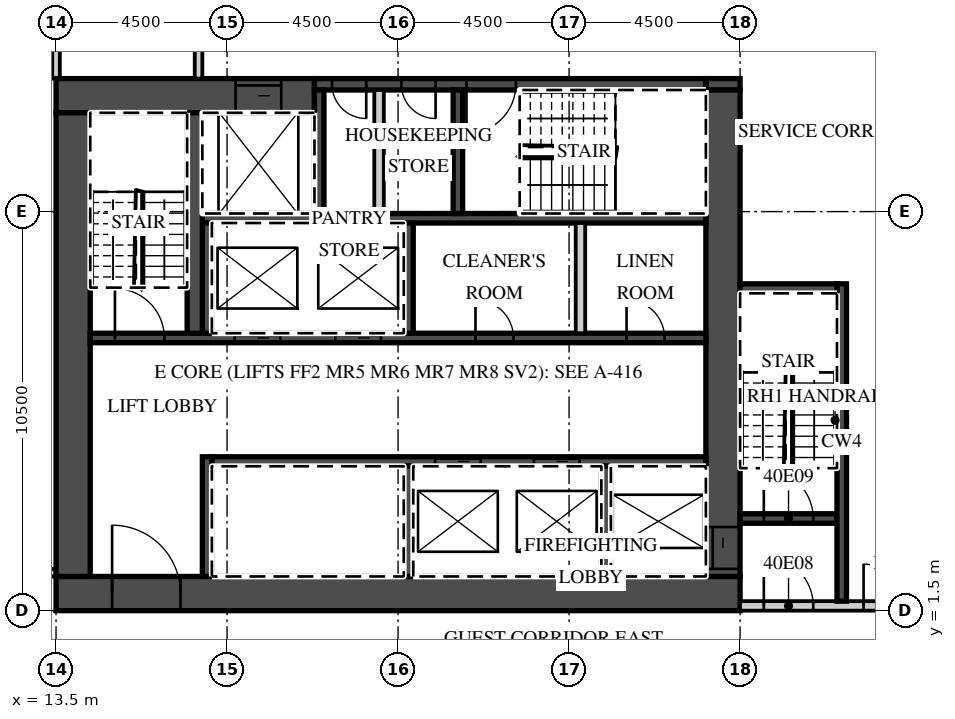
"""IFC4 building model, lengths in metres.
Left out: names, types, materials, properties, quantities, classifications, styles, units other than length and angle.
Written with IfcOpenShell. Run it as: python <this file> out.ifc"""

import sys

from ifc_helpers import new_model, si_unit, direction, frame, frame_2d, origin, place, context, subcontext, project, spatial, rectangle, extrude, element, fill, save


model = new_model("IFC4")
c1 = context("Model", 3, precision=1e-05, world=origin(), true_north=direction((0.0, 1.0)))
c2 = subcontext(c1, "Body", "Model", "MODEL_VIEW")
j1 = project(units=[si_unit("LENGTHUNIT", "METRE"), si_unit("PLANEANGLEUNIT", "RADIAN")], contexts=[c1])
p1 = place(None, origin())
s1 = spatial("IfcSite", under=j1, at=p1, CompositionType="ELEMENT")
p2 = place(p1, origin())
s2 = spatial("IfcBuilding", under=s1, at=p2, CompositionType="ELEMENT")
p3 = place(p2, frame((0.0, 0.0, 173.5)))
s3 = spatial("IfcBuildingStorey", under=s2, at=p3, CompositionType="ELEMENT", Elevation=173.5)
p4 = place(p3, frame((13.5, 15.5, 0.0), z_axis=(0.0, 0.0, 1.0), x_axis=(0.0, 1.0, 0.0)))
e1 = element("IfcWall", 1, at=p4, inside=s3, PredefinedType="PARTITIONING", context=c2, shape_type="SweptSolid", body=[
    extrude(rectangle(XDim=6.089, YDim=0.2, at=frame_2d((3.044, 0.0))), origin(), (0.0, 0.0, 1.0), 3.02),
])
p5 = place(p3, frame((-13.5, 2.5, 0.0), z_axis=(0.0, 0.0, 1.0), x_axis=(1.0, 0.0, 0.0)))
e2 = element("IfcWall", 2, at=p5, inside=s3, PredefinedType="PARTITIONING", context=c2, shape_type="SweptSolid", body=[
    extrude(rectangle(XDim=27.0, YDim=0.2, at=frame_2d((13.5, 0.0))), origin(), (0.0, 0.0, 1.0), 3.02),
])
p6 = place(p5, frame((0.575, 0.0, 0.0)))
e3 = element("IfcOpeningElement", 3, at=p6, cuts=e2, PredefinedType="OPENING", context=c2, shape_type="SweptSolid", body=[
    extrude(rectangle(XDim=1.0, YDim=2.1, at=frame_2d((0.5, 1.05))), frame((0.0, 0.11, 0.0), z_axis=(0.0, -1.0, 0.0), x_axis=(1.0, 0.0, 0.0)), (0.0, 0.0, 1.0), 0.22),
])
p7 = place(p5, frame((7.45, 0.0, 0.0)))
e4 = element("IfcOpeningElement", 4, at=p7, cuts=e2, PredefinedType="OPENING", context=c2, shape_type="SweptSolid", body=[
    extrude(rectangle(XDim=1.0, YDim=2.1, at=frame_2d((0.5, 1.05))), frame((0.0, 0.11, 0.0), z_axis=(0.0, -1.0, 0.0), x_axis=(1.0, 0.0, 0.0)), (0.0, 0.0, 1.0), 0.22),
])
p8 = place(p5, frame((11.925, 0.0, 0.0)))
e5 = element("IfcOpeningElement", 5, at=p8, cuts=e2, PredefinedType="OPENING", context=c2, shape_type="SweptSolid", body=[
    extrude(rectangle(XDim=1.0, YDim=2.1, at=frame_2d((0.5, 1.05))), frame((0.0, 0.11, 0.0), z_axis=(0.0, -1.0, 0.0), x_axis=(1.0, 0.0, 0.0)), (0.0, 0.0, 1.0), 0.22),
])
p9 = place(p5, frame((15.938, 0.0, 0.0)))
e6 = element("IfcOpeningElement", 6, at=p9, cuts=e2, PredefinedType="OPENING", context=c2, shape_type="SweptSolid", body=[
    extrude(rectangle(XDim=1.2, YDim=2.1, at=frame_2d((0.6, 1.05))), frame((0.0, 0.11, 0.0), z_axis=(0.0, -1.0, 0.0), x_axis=(1.0, 0.0, 0.0)), (0.0, 0.0, 1.0), 0.22),
])
p10 = place(p5, frame((25.425, 0.0, 0.0)))
e7 = element("IfcOpeningElement", 7, at=p10, cuts=e2, PredefinedType="OPENING", context=c2, shape_type="SweptSolid", body=[
    extrude(rectangle(XDim=1.0, YDim=2.1, at=frame_2d((0.5, 1.05))), frame((0.0, 0.11, 0.0), z_axis=(0.0, -1.0, 0.0), x_axis=(1.0, 0.0, 0.0)), (0.0, 0.0, 1.0), 0.22),
])
p11 = place(p3, frame((13.5, 1.95, 0.0), z_axis=(0.0, 0.0, 1.0), x_axis=(1.0, 0.0, 0.0)))
e8 = element("IfcWall", 8, at=p11, inside=s3, PredefinedType="SHEAR", context=c2, shape_type="SweptSolid", body=[
    extrude(rectangle(XDim=18.0, YDim=0.9, at=frame_2d((9.0, 0.0))), origin(), (0.0, 0.0, 1.0), 3.02),
])
p12 = place(p11, frame((1.475, 0.0, 0.0)))
e9 = element("IfcOpeningElement", 9, at=p12, cuts=e8, PredefinedType="OPENING", context=c2, shape_type="SweptSolid", body=[
    extrude(rectangle(XDim=1.8, YDim=2.1, at=frame_2d((0.9, 1.05))), frame((0.0, 0.46, 0.0), z_axis=(0.0, -1.0, 0.0), x_axis=(1.0, 0.0, 0.0)), (0.0, 0.0, 1.0), 0.92),
])
p13 = place(p3, frame((13.5, 15.05, 0.0), z_axis=(0.0, 0.0, 1.0), x_axis=(1.0, 0.0, 0.0)))
e10 = element("IfcWall", 10, at=p13, inside=s3, PredefinedType="SHEAR", context=c2, shape_type="SweptSolid", body=[
    extrude(rectangle(XDim=6.8, YDim=0.9, at=frame_2d((3.4, 0.0))), origin(), (0.0, 0.0, 1.0), 3.02),
])
p14 = place(p13, frame((4.725, 0.0, 0.0)))
e11 = element("IfcOpeningElement", 11, at=p14, cuts=e10, PredefinedType="OPENING", context=c2, shape_type="SweptSolid", body=[
    extrude(rectangle(XDim=1.2, YDim=2.1, at=frame_2d((0.6, 1.05))), frame((0.0, 0.46, 0.0), z_axis=(0.0, -1.0, 0.0), x_axis=(1.0, 0.0, 0.0)), (0.0, 0.0, 1.0), 0.92),
])
p15 = place(p3, frame((30.6, 15.35, 0.0), z_axis=(0.0, 0.0, 1.0), x_axis=(1.0, 0.0, 0.0)))
e12 = element("IfcWall", 12, at=p15, inside=s3, PredefinedType="SHEAR", context=c2, shape_type="SweptSolid", body=[
    extrude(rectangle(XDim=0.9, YDim=0.3, at=frame_2d((0.45, 0.0))), origin(), (0.0, 0.0, 1.0), 3.02),
])
p16 = place(p3, frame((20.3, 15.35, 0.0), z_axis=(0.0, 0.0, 1.0), x_axis=(1.0, 0.0, 0.0)))
e13 = element("IfcWall", 13, at=p16, inside=s3, PredefinedType="SHEAR", context=c2, shape_type="SweptSolid", body=[
    extrude(rectangle(XDim=10.3, YDim=0.3, at=frame_2d((5.15, 0.0))), origin(), (0.0, 0.0, 1.0), 3.02),
])
p17 = place(p16, frame((4.0, 0.0, 0.0)))
e14 = element("IfcOpeningElement", 14, at=p17, cuts=e13, PredefinedType="OPENING", context=c2, shape_type="SweptSolid", body=[
    extrude(rectangle(XDim=1.3, YDim=2.1, at=frame_2d((0.65, 1.05))), frame((0.0, 0.16, 0.0), z_axis=(0.0, -1.0, 0.0), x_axis=(1.0, 0.0, 0.0)), (0.0, 0.0, 1.0), 0.32),
])
p18 = place(p16, frame((2.288, 0.0, 0.0)))
e15 = element("IfcOpeningElement", 15, at=p18, cuts=e13, PredefinedType="OPENING", context=c2, shape_type="SweptSolid", body=[
    extrude(rectangle(XDim=0.9, YDim=2.1, at=frame_2d((0.45, 1.05))), frame((0.0, 0.16, 0.0), z_axis=(0.0, -1.0, 0.0), x_axis=(1.0, 0.0, 0.0)), (0.0, 0.0, 1.0), 0.32),
])
p19 = place(p16, frame((0.462, 0.0, 0.0)))
e16 = element("IfcOpeningElement", 16, at=p19, cuts=e13, PredefinedType="OPENING", context=c2, shape_type="SweptSolid", body=[
    extrude(rectangle(XDim=0.9, YDim=2.1, at=frame_2d((0.45, 1.05))), frame((0.0, 0.16, 0.0), z_axis=(0.0, -1.0, 0.0), x_axis=(1.0, 0.0, 0.0)), (0.0, 0.0, 1.0), 0.32),
])
p20 = place(p3, frame((31.05, 2.4, 0.0), z_axis=(0.0, 0.0, 1.0), x_axis=(0.0, 1.0, 0.0)))
e17 = element("IfcWall", 17, at=p20, inside=s3, PredefinedType="SHEAR", context=c2, shape_type="SweptSolid", body=[
    extrude(rectangle(XDim=12.8, YDim=0.9, at=frame_2d((6.4, 0.0))), origin(), (0.0, 0.0, 1.0), 3.02),
])
p21 = place(p20, frame((0.2, 0.0, 0.0)))
e18 = element("IfcOpeningElement", 18, at=p21, cuts=e17, PredefinedType="OPENING", context=c2, shape_type="SweptSolid", body=[
    extrude(rectangle(XDim=1.1, YDim=2.1, at=frame_2d((0.55, 1.05))), frame((0.0, 0.46, 0.0), z_axis=(0.0, -1.0, 0.0), x_axis=(1.0, 0.0, 0.0)), (0.0, 0.0, 1.0), 0.92),
])
p22 = place(p3, frame((13.95, 2.4, 0.0), z_axis=(0.0, 0.0, 1.0), x_axis=(0.0, 1.0, 0.0)))
e19 = element("IfcWall", 19, at=p22, inside=s3, PredefinedType="SHEAR", context=c2, shape_type="SweptSolid", body=[
    extrude(rectangle(XDim=12.2, YDim=0.9, at=frame_2d((6.1, 0.0))), origin(), (0.0, 0.0, 1.0), 3.02),
])
p23 = place(p3, frame((17.6, 5.425, 0.0), z_axis=(0.0, 0.0, 1.0), x_axis=(1.0, 0.0, 0.0)))
e20 = element("IfcWall", 20, at=p23, inside=s3, PredefinedType="SHEAR", context=c2, shape_type="SweptSolid", body=[
    extrude(rectangle(XDim=13.0, YDim=0.25, at=frame_2d((6.5, 0.0))), origin(), (0.0, 0.0, 1.0), 3.02),
])
p24 = place(p23, frame((8.475, 0.0, 0.0)))
e21 = element("IfcOpeningElement", 21, at=p24, cuts=e20, PredefinedType="OPENING", context=c2, shape_type="SweptSolid", body=[
    extrude(rectangle(XDim=1.2, YDim=2.1, at=frame_2d((0.6, 1.05))), frame((0.0, 0.135, 0.0), z_axis=(0.0, -1.0, 0.0), x_axis=(1.0, 0.0, 0.0)), (0.0, 0.0, 1.0), 0.27),
])
p25 = place(p23, frame((5.875, 0.0, 0.0)))
e22 = element("IfcOpeningElement", 22, at=p25, cuts=e20, PredefinedType="OPENING", context=c2, shape_type="SweptSolid", body=[
    extrude(rectangle(XDim=1.2, YDim=2.1, at=frame_2d((0.6, 1.05))), frame((0.0, 0.135, 0.0), z_axis=(0.0, -1.0, 0.0), x_axis=(1.0, 0.0, 0.0)), (0.0, 0.0, 1.0), 0.27),
])
p26 = place(p3, frame((17.475, 2.4, 0.0), z_axis=(0.0, 0.0, 1.0), x_axis=(0.0, 1.0, 0.0)))
e23 = element("IfcWall", 23, at=p26, inside=s3, PredefinedType="SHEAR", context=c2, shape_type="SweptSolid", body=[
    extrude(rectangle(XDim=3.15, YDim=0.25, at=frame_2d((1.575, 0.0))), origin(), (0.0, 0.0, 1.0), 3.02),
])
for number, where, z_axis, x_axis in (
    (24, (27.975, 2.4, 0.0), (0.0, 0.0, 1.0), (0.0, 1.0, 0.0)),
    (25, (22.775, 2.4, 0.0), (0.0, 0.0, 1.0), (0.0, 1.0, 0.0)),
):
    element("IfcWall", number, at=place(p3, frame(where, z_axis=z_axis, x_axis=x_axis)), inside=s3, PredefinedType="SHEAR", context=c2, shape_type="SweptSolid", body=[
        extrude(rectangle(XDim=2.9, YDim=0.25, at=frame_2d((1.45, 0.0))), origin(), (0.0, 0.0, 1.0), 3.02),
    ])
p27 = place(p3, frame((14.4, 8.675, 0.0), z_axis=(0.0, 0.0, 1.0), x_axis=(1.0, 0.0, 0.0)))
e26 = element("IfcWall", 26, at=p27, inside=s3, PredefinedType="SHEAR", context=c2, shape_type="SweptSolid", body=[
    extrude(rectangle(XDim=16.2, YDim=0.25, at=frame_2d((8.1, 0.0))), origin(), (0.0, 0.0, 1.0), 3.02),
])
p28 = place(p27, frame((6.45, 0.0, 0.0)))
e27 = element("IfcOpeningElement", 27, at=p28, cuts=e26, PredefinedType="OPENING", context=c2, shape_type="SweptSolid", body=[
    extrude(rectangle(XDim=1.2, YDim=2.1, at=frame_2d((0.6, 1.05))), frame((0.0, 0.135, 0.0), z_axis=(0.0, -1.0, 0.0), x_axis=(1.0, 0.0, 0.0)), (0.0, 0.0, 1.0), 0.27),
])
p29 = place(p27, frame((3.8, 0.0, 0.0)))
e28 = element("IfcOpeningElement", 28, at=p29, cuts=e26, PredefinedType="OPENING", context=c2, shape_type="SweptSolid", body=[
    extrude(rectangle(XDim=1.2, YDim=2.1, at=frame_2d((0.6, 1.05))), frame((0.0, 0.135, 0.0), z_axis=(0.0, -1.0, 0.0), x_axis=(1.0, 0.0, 0.0)), (0.0, 0.0, 1.0), 0.27),
])
p30 = place(p27, frame((0.65, 0.0, 0.0)))
e29 = element("IfcOpeningElement", 29, at=p30, cuts=e26, PredefinedType="OPENING", context=c2, shape_type="SweptSolid", body=[
    extrude(rectangle(XDim=1.3, YDim=2.1, at=frame_2d((0.65, 1.05))), frame((0.0, 0.135, 0.0), z_axis=(0.0, -1.0, 0.0), x_axis=(1.0, 0.0, 0.0)), (0.0, 0.0, 1.0), 0.27),
])
p31 = place(p27, frame((14.113, 0.0, 0.0)))
e30 = element("IfcOpeningElement", 30, at=p31, cuts=e26, PredefinedType="OPENING", context=c2, shape_type="SweptSolid", body=[
    extrude(rectangle(XDim=1.0, YDim=2.1, at=frame_2d((0.5, 1.05))), frame((0.0, 0.135, 0.0), z_axis=(0.0, -1.0, 0.0), x_axis=(1.0, 0.0, 0.0)), (0.0, 0.0, 1.0), 0.27),
])
p32 = place(p27, frame((10.137, 0.0, 0.0)))
e31 = element("IfcOpeningElement", 31, at=p32, cuts=e26, PredefinedType="OPENING", context=c2, shape_type="SweptSolid", body=[
    extrude(rectangle(XDim=1.0, YDim=2.1, at=frame_2d((0.5, 1.05))), frame((0.0, 0.135, 0.0), z_axis=(0.0, -1.0, 0.0), x_axis=(1.0, 0.0, 0.0)), (0.0, 0.0, 1.0), 0.27),
])
p33 = place(p3, frame((17.35, 11.825, 0.0), z_axis=(0.0, 0.0, 1.0), x_axis=(1.0, 0.0, 0.0)))
e32 = element("IfcWall", 32, at=p33, inside=s3, PredefinedType="SHEAR", context=c2, shape_type="SweptSolid", body=[
    extrude(rectangle(XDim=13.25, YDim=0.25, at=frame_2d((6.625, 0.0))), origin(), (0.0, 0.0, 1.0), 3.02),
])
for number, where, z_axis, x_axis in (
    (33, (17.475, 8.8, 0.0), (0.0, 0.0, 1.0), (0.0, 1.0, 0.0)),
    (34, (22.775, 8.8, 0.0), (0.0, 0.0, 1.0), (0.0, 1.0, 0.0)),
):
    element("IfcWall", number, at=place(p3, frame(where, z_axis=z_axis, x_axis=x_axis)), inside=s3, PredefinedType="SHEAR", context=c2, shape_type="SweptSolid", body=[
        extrude(rectangle(XDim=2.9, YDim=0.25, at=frame_2d((1.45, 0.0))), origin(), (0.0, 0.0, 1.0), 3.02),
    ])
p34 = place(p3, frame((27.3, 8.8, 0.0), z_axis=(0.0, 0.0, 1.0), x_axis=(0.0, 1.0, 0.0)))
e35 = element("IfcWall", 35, at=p34, inside=s3, PredefinedType="PARTITIONING", context=c2, shape_type="SweptSolid", body=[
    extrude(rectangle(XDim=2.9, YDim=0.25, at=frame_2d((1.45, 0.0))), origin(), (0.0, 0.0, 1.0), 3.02),
])
p35 = place(p3, frame((17.15, 8.8, 0.0), z_axis=(0.0, 0.0, 1.0), x_axis=(0.0, 1.0, 0.0)))
e36 = element("IfcWall", 36, at=p35, inside=s3, PredefinedType="SHEAR", context=c2, shape_type="SweptSolid", body=[
    extrude(rectangle(XDim=5.8, YDim=0.4, at=frame_2d((2.9, 0.0))), origin(), (0.0, 0.0, 1.0), 3.02),
])
for number, where, z_axis, x_axis in (
    (37, (20.425, 11.95, 0.0), (0.0, 0.0, 1.0), (0.0, 1.0, 0.0)),
    (38, (24.075, 11.95, 0.0), (0.0, 0.0, 1.0), (0.0, 1.0, 0.0)),
):
    element("IfcWall", number, at=place(p3, frame(where, z_axis=z_axis, x_axis=x_axis)), inside=s3, PredefinedType="SHEAR", context=c2, shape_type="SweptSolid", body=[
        extrude(rectangle(XDim=3.25, YDim=0.25, at=frame_2d((1.625, 0.0))), origin(), (0.0, 0.0, 1.0), 3.02),
    ])
p36 = place(p3, frame((22.0, 11.95, 0.0), z_axis=(0.0, 0.0, 1.0), x_axis=(0.0, 1.0, 0.0)))
e39 = element("IfcWall", 39, at=p36, inside=s3, PredefinedType="PARTITIONING", context=c2, shape_type="SweptSolid", body=[
    extrude(rectangle(XDim=3.25, YDim=0.25, at=frame_2d((1.625, 0.0))), origin(), (0.0, 0.0, 1.0), 3.02),
])
p37 = place(p3, frame((31.5, 1.625, 0.0), z_axis=(0.0, 0.0, 1.0), x_axis=(1.0, 0.0, 0.0)))
e40 = element("IfcWall", 40, at=p37, inside=s3, PredefinedType="PARTITIONING", context=c2, shape_type="SweptSolid", body=[
    extrude(rectangle(XDim=8.035, YDim=0.25, at=frame_2d((4.018, 0.0))), origin(), (0.0, 0.0, 1.0), 3.02),
])
p38 = place(p37, frame((0.625, 0.0, 0.0)))
e41 = element("IfcOpeningElement", 41, at=p38, cuts=e40, PredefinedType="OPENING", context=c2, shape_type="SweptSolid", body=[
    extrude(rectangle(XDim=1.3, YDim=2.1, at=frame_2d((0.65, 1.05))), frame((0.0, 0.135, 0.0), z_axis=(0.0, -1.0, 0.0), x_axis=(1.0, 0.0, 0.0)), (0.0, 0.0, 1.0), 0.27),
])
p39 = place(p37, frame((3.25, 0.0, 0.0)))
e42 = element("IfcOpeningElement", 42, at=p39, cuts=e40, PredefinedType="OPENING", context=c2, shape_type="SweptSolid", body=[
    extrude(rectangle(XDim=1.1, YDim=2.1, at=frame_2d((0.55, 1.05))), frame((0.0, 0.135, 0.0), z_axis=(0.0, -1.0, 0.0), x_axis=(1.0, 0.0, 0.0)), (0.0, 0.0, 1.0), 0.27),
])
p40 = place(p3, frame((31.5, 3.925, 0.0), z_axis=(0.0, 0.0, 1.0), x_axis=(1.0, 0.0, 0.0)))
e43 = element("IfcWall", 43, at=p40, inside=s3, PredefinedType="SHEAR", context=c2, shape_type="SweptSolid", body=[
    extrude(rectangle(XDim=2.55, YDim=0.25, at=frame_2d((1.275, 0.0))), origin(), (0.0, 0.0, 1.0), 3.02),
])
p41 = place(p40, frame((0.625, 0.0, 0.0)))
e44 = element("IfcOpeningElement", 44, at=p41, cuts=e43, PredefinedType="OPENING", context=c2, shape_type="SweptSolid", body=[
    extrude(rectangle(XDim=1.3, YDim=2.1, at=frame_2d((0.65, 1.05))), frame((0.0, 0.135, 0.0), z_axis=(0.0, -1.0, 0.0), x_axis=(1.0, 0.0, 0.0)), (0.0, 0.0, 1.0), 0.27),
])
p42 = place(p3, frame((34.175, 1.75, 0.0), z_axis=(0.0, 0.0, 1.0), x_axis=(0.0, 1.0, 0.0)))
e45 = element("IfcWall", 45, at=p42, inside=s3, PredefinedType="SHEAR", context=c2, shape_type="SweptSolid", body=[
    extrude(rectangle(XDim=8.35, YDim=0.25, at=frame_2d((4.175, 0.0))), origin(), (0.0, 0.0, 1.0), 3.02),
])
p43 = place(p3, frame((31.5, 9.975, 0.0), z_axis=(0.0, 0.0, 1.0), x_axis=(1.0, 0.0, 0.0)))
e46 = element("IfcWall", 46, at=p43, inside=s3, PredefinedType="SHEAR", context=c2, shape_type="SweptSolid", body=[
    extrude(rectangle(XDim=2.55, YDim=0.25, at=frame_2d((1.275, 0.0))), origin(), (0.0, 0.0, 1.0), 3.02),
])
p44 = place(p3, frame((17.25, 15.5, 0.0), z_axis=(0.0, 0.0, 1.0), x_axis=(0.0, 1.0, 0.0)))
e47 = element("IfcWall", 47, at=p44, inside=s3, PredefinedType="PARTITIONING", context=c2, shape_type="SweptSolid", body=[
    extrude(rectangle(XDim=2.2, YDim=0.2, at=frame_2d((1.1, 0.0))), origin(), (0.0, 0.0, 1.0), 3.02),
])
p45 = place(p28, origin())
e48 = element("IfcDoor", 48, at=p45, inside=s3, OperationType="SLIDING_TO_LEFT", PredefinedType="DOOR", context=c2, shape_type="SweptSolid", body=[
    extrude(rectangle(XDim=1.2, YDim=2.1, at=frame_2d((0.6, 1.05))), frame((0.0, 0.025, 0.0), z_axis=(0.0, -1.0, 0.0), x_axis=(1.0, 0.0, 0.0)), (0.0, 0.0, 1.0), 0.05),
])
fill(e27, e48)
p46 = place(p29, origin())
e49 = element("IfcDoor", 49, at=p46, inside=s3, OperationType="SLIDING_TO_RIGHT", PredefinedType="DOOR", context=c2, shape_type="SweptSolid", body=[
    extrude(rectangle(XDim=1.2, YDim=2.1, at=frame_2d((0.6, 1.05))), frame((0.0, 0.025, 0.0), z_axis=(0.0, -1.0, 0.0), x_axis=(1.0, 0.0, 0.0)), (0.0, 0.0, 1.0), 0.05),
])
fill(e28, e49)
p47 = place(p24, origin())
e50 = element("IfcDoor", 50, at=p47, inside=s3, OperationType="SLIDING_TO_LEFT", PredefinedType="DOOR", context=c2, shape_type="SweptSolid", body=[
    extrude(rectangle(XDim=1.2, YDim=2.1, at=frame_2d((0.6, 1.05))), frame((0.0, 0.025, 0.0), z_axis=(0.0, -1.0, 0.0), x_axis=(1.0, 0.0, 0.0)), (0.0, 0.0, 1.0), 0.05),
])
fill(e21, e50)
p48 = place(p25, origin())
e51 = element("IfcDoor", 51, at=p48, inside=s3, OperationType="SLIDING_TO_RIGHT", PredefinedType="DOOR", context=c2, shape_type="SweptSolid", body=[
    extrude(rectangle(XDim=1.2, YDim=2.1, at=frame_2d((0.6, 1.05))), frame((0.0, 0.025, 0.0), z_axis=(0.0, -1.0, 0.0), x_axis=(1.0, 0.0, 0.0)), (0.0, 0.0, 1.0), 0.05),
])
fill(e22, e51)
p49 = place(p14, origin())
e52 = element("IfcDoor", 52, at=p49, inside=s3, OperationType="SLIDING_TO_LEFT", PredefinedType="DOOR", context=c2, shape_type="SweptSolid", body=[
    extrude(rectangle(XDim=1.2, YDim=2.1, at=frame_2d((0.6, 1.05))), frame((0.0, 0.025, 0.0), z_axis=(0.0, -1.0, 0.0), x_axis=(1.0, 0.0, 0.0)), (0.0, 0.0, 1.0), 0.05),
])
fill(e11, e52)
p50 = place(p21, origin())
e53 = element("IfcDoor", 53, at=p50, inside=s3, OperationType="SLIDING_TO_LEFT", PredefinedType="DOOR", context=c2, shape_type="SweptSolid", body=[
    extrude(rectangle(XDim=1.1, YDim=2.1, at=frame_2d((0.55, 1.05))), frame((0.0, 0.025, 0.0), z_axis=(0.0, -1.0, 0.0), x_axis=(1.0, 0.0, 0.0)), (0.0, 0.0, 1.0), 0.05),
])
fill(e18, e53)
p51 = place(p12, origin())
e54 = element("IfcDoor", 54, at=p51, inside=s3, OperationType="DOUBLE_DOOR_DOUBLE_SWING", PredefinedType="DOOR", context=c2, shape_type="SweptSolid", body=[
    extrude(rectangle(XDim=1.8, YDim=2.1, at=frame_2d((0.9, 1.05))), frame((0.0, 0.025, 0.0), z_axis=(0.0, -1.0, 0.0), x_axis=(1.0, 0.0, 0.0)), (0.0, 0.0, 1.0), 0.05),
])
fill(e9, e54)
p52 = place(p38, origin())
e55 = element("IfcDoor", 55, at=p52, inside=s3, OperationType="SINGLE_SWING_LEFT", PredefinedType="DOOR", context=c2, shape_type="SweptSolid", body=[
    extrude(rectangle(XDim=1.3, YDim=2.1, at=frame_2d((0.65, 1.05))), frame((0.0, 0.025, 0.0), z_axis=(0.0, -1.0, 0.0), x_axis=(1.0, 0.0, 0.0)), (0.0, 0.0, 1.0), 0.05),
])
fill(e41, e55)
p53 = place(p41, origin())
e56 = element("IfcDoor", 56, at=p53, inside=s3, OperationType="SINGLE_SWING_LEFT", PredefinedType="DOOR", context=c2, shape_type="SweptSolid", body=[
    extrude(rectangle(XDim=1.3, YDim=2.1, at=frame_2d((0.65, 1.05))), frame((0.0, 0.025, 0.0), z_axis=(0.0, -1.0, 0.0), x_axis=(1.0, 0.0, 0.0)), (0.0, 0.0, 1.0), 0.05),
])
fill(e44, e56)
p54 = place(p39, origin())
e57 = element("IfcDoor", 57, at=p54, inside=s3, OperationType="SINGLE_SWING_LEFT", PredefinedType="DOOR", context=c2, shape_type="SweptSolid", body=[
    extrude(rectangle(XDim=1.1, YDim=2.1, at=frame_2d((0.55, 1.05))), frame((0.0, 0.025, 0.0), z_axis=(0.0, -1.0, 0.0), x_axis=(1.0, 0.0, 0.0)), (0.0, 0.0, 1.0), 0.05),
])
fill(e42, e57)
p55 = place(p30, origin())
e58 = element("IfcDoor", 58, at=p55, inside=s3, OperationType="SINGLE_SWING_LEFT", PredefinedType="DOOR", context=c2, shape_type="SweptSolid", body=[
    extrude(rectangle(XDim=1.3, YDim=2.1, at=frame_2d((0.65, 1.05))), frame((0.0, 0.025, 0.0), z_axis=(0.0, -1.0, 0.0), x_axis=(1.0, 0.0, 0.0)), (0.0, 0.0, 1.0), 0.05),
])
fill(e29, e58)
p56 = place(p17, origin())
e59 = element("IfcDoor", 59, at=p56, inside=s3, OperationType="SINGLE_SWING_LEFT", PredefinedType="DOOR", context=c2, shape_type="SweptSolid", body=[
    extrude(rectangle(XDim=1.3, YDim=2.1, at=frame_2d((0.65, 1.05))), frame((0.0, 0.025, 0.0), z_axis=(0.0, -1.0, 0.0), x_axis=(1.0, 0.0, 0.0)), (0.0, 0.0, 1.0), 0.05),
])
fill(e14, e59)
p57 = place(p18, origin())
e60 = element("IfcDoor", 60, at=p57, inside=s3, OperationType="SINGLE_SWING_RIGHT", PredefinedType="DOOR", context=c2, shape_type="SweptSolid", body=[
    extrude(rectangle(XDim=0.9, YDim=2.1, at=frame_2d((0.45, 1.05))), frame((0.0, 0.025, 0.0), z_axis=(0.0, -1.0, 0.0), x_axis=(1.0, 0.0, 0.0)), (0.0, 0.0, 1.0), 0.05),
])
fill(e15, e60)
p58 = place(p19, origin())
e61 = element("IfcDoor", 61, at=p58, inside=s3, OperationType="SINGLE_SWING_RIGHT", PredefinedType="DOOR", context=c2, shape_type="SweptSolid", body=[
    extrude(rectangle(XDim=0.9, YDim=2.1, at=frame_2d((0.45, 1.05))), frame((0.0, 0.025, 0.0), z_axis=(0.0, -1.0, 0.0), x_axis=(1.0, 0.0, 0.0)), (0.0, 0.0, 1.0), 0.05),
])
fill(e16, e61)
p59 = place(p31, origin())
e62 = element("IfcDoor", 62, at=p59, inside=s3, OperationType="SINGLE_SWING_LEFT", PredefinedType="DOOR", context=c2, shape_type="SweptSolid", body=[
    extrude(rectangle(XDim=1.0, YDim=2.1, at=frame_2d((0.5, 1.05))), frame((0.0, 0.025, 0.0), z_axis=(0.0, -1.0, 0.0), x_axis=(1.0, 0.0, 0.0)), (0.0, 0.0, 1.0), 0.05),
])
fill(e30, e62)
p60 = place(p32, origin())
e63 = element("IfcDoor", 63, at=p60, inside=s3, OperationType="SINGLE_SWING_LEFT", PredefinedType="DOOR", context=c2, shape_type="SweptSolid", body=[
    extrude(rectangle(XDim=1.0, YDim=2.1, at=frame_2d((0.5, 1.05))), frame((0.0, 0.025, 0.0), z_axis=(0.0, -1.0, 0.0), x_axis=(1.0, 0.0, 0.0)), (0.0, 0.0, 1.0), 0.05),
])
fill(e31, e63)
save(model, sys.argv[1])
